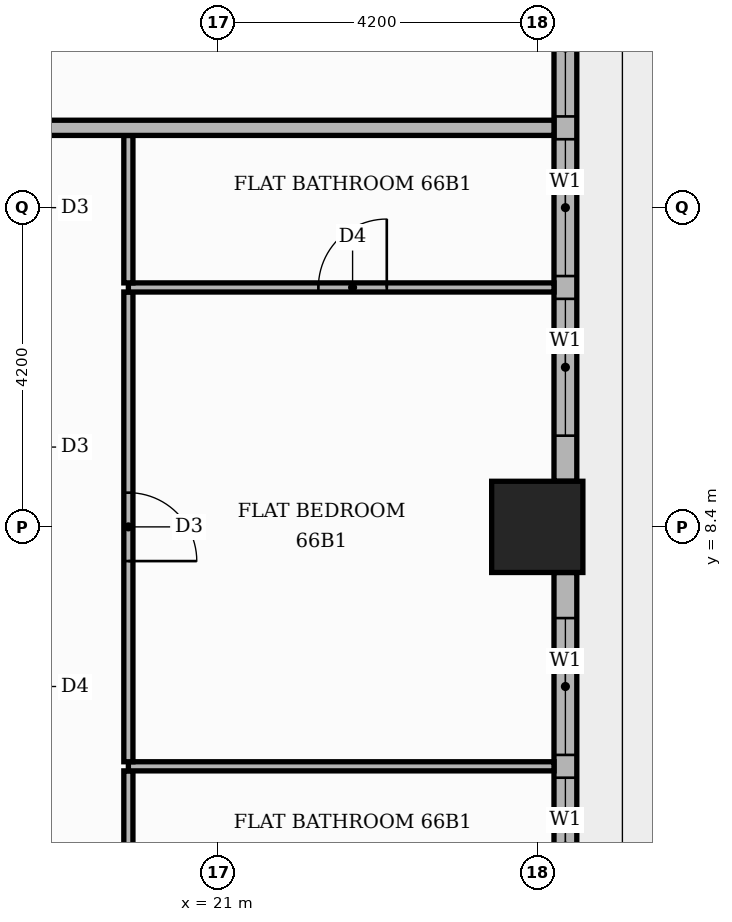
"""IFC4 building model, lengths in metres.
Left out: names, types, materials, properties, quantities, classifications, styles, units other than length and angle.
Written with IfcOpenShell. Run it as: python <this file> out.ifc"""

import sys

from ifc_helpers import new_model, si_unit, direction, frame, frame_2d, origin, origin_2d, place, context, subcontext, project, spatial, rectangle, extrude, element, fill, save


model = new_model("IFC4")
c1 = context("Model", 3, precision=1e-05, world=origin(), true_north=direction((0.0, 1.0)))
c2 = subcontext(c1, "Body", "Model", "MODEL_VIEW")
j1 = project(units=[si_unit("LENGTHUNIT", "METRE"), si_unit("PLANEANGLEUNIT", "RADIAN")], contexts=[c1])
p1 = place(None, origin())
s1 = spatial("IfcSite", under=j1, at=p1, CompositionType="ELEMENT")
p2 = place(p1, origin())
s2 = spatial("IfcBuilding", under=s1, at=p2, CompositionType="ELEMENT")
p3 = place(p2, frame((0.0, 0.0, 275.7)))
s3 = spatial("IfcBuildingStorey", under=s2, at=p3, CompositionType="ELEMENT", Elevation=275.7)
p4 = place(p3, frame((25.2, 8.4, 0.0), z_axis=(0.0, 0.0, 1.0), x_axis=(1.0, 0.0, 0.0)))
e1 = element("IfcColumn", 1, at=p4, inside=s3, PredefinedType="COLUMN", context=c2, shape_type="SweptSolid", body=[
    extrude(rectangle(XDim=1.2, YDim=1.2, at=origin_2d()), origin(), (0.0, 0.0, 1.0), 3.9),
])
p5 = place(p3, frame((25.57, 0.6, 0.0), z_axis=(0.0, 0.0, 1.0), x_axis=(0.0, 1.0, 0.0)))
e2 = element("IfcWall", 2, at=p5, inside=s3, PredefinedType="STANDARD", context=c2, shape_type="SweptSolid", body=[
    extrude(rectangle(XDim=7.2, YDim=0.3, at=frame_2d((3.6, 0.0))), origin(), (0.0, 0.0, 1.0), 3.48),
])
p6 = place(p5, frame((0.6, 0.0, 0.9)))
e3 = element("IfcOpeningElement", 3, at=p6, cuts=e2, PredefinedType="OPENING", context=c2, shape_type="SweptSolid", body=[
    extrude(rectangle(XDim=1.8, YDim=2.1, at=frame_2d((0.9, 1.05))), frame((0.0, 0.16, 0.0), z_axis=(0.0, -1.0, 0.0), x_axis=(1.0, 0.0, 0.0)), (0.0, 0.0, 1.0), 0.32),
])
p7 = place(p5, frame((2.7, 0.0, 0.9)))
e4 = element("IfcOpeningElement", 4, at=p7, cuts=e2, PredefinedType="OPENING", context=c2, shape_type="SweptSolid", body=[
    extrude(rectangle(XDim=1.8, YDim=2.1, at=frame_2d((0.9, 1.05))), frame((0.0, 0.16, 0.0), z_axis=(0.0, -1.0, 0.0), x_axis=(1.0, 0.0, 0.0)), (0.0, 0.0, 1.0), 0.32),
])
p8 = place(p5, frame((4.8, 0.0, 0.9)))
e5 = element("IfcOpeningElement", 5, at=p8, cuts=e2, PredefinedType="OPENING", context=c2, shape_type="SweptSolid", body=[
    extrude(rectangle(XDim=1.8, YDim=2.1, at=frame_2d((0.9, 1.05))), frame((0.0, 0.16, 0.0), z_axis=(0.0, -1.0, 0.0), x_axis=(1.0, 0.0, 0.0)), (0.0, 0.0, 1.0), 0.32),
])
p9 = place(p3, frame((25.57, 9.0, 0.0), z_axis=(0.0, 0.0, 1.0), x_axis=(0.0, 1.0, 0.0)))
e6 = element("IfcWall", 6, at=p9, inside=s3, PredefinedType="STANDARD", context=c2, shape_type="SweptSolid", body=[
    extrude(rectangle(XDim=7.2, YDim=0.3, at=frame_2d((3.6, 0.0))), origin(), (0.0, 0.0, 1.0), 3.48),
])
p10 = place(p9, frame((0.6, 0.0, 0.9)))
e7 = element("IfcOpeningElement", 7, at=p10, cuts=e6, PredefinedType="OPENING", context=c2, shape_type="SweptSolid", body=[
    extrude(rectangle(XDim=1.8, YDim=2.1, at=frame_2d((0.9, 1.05))), frame((0.0, 0.16, 0.0), z_axis=(0.0, -1.0, 0.0), x_axis=(1.0, 0.0, 0.0)), (0.0, 0.0, 1.0), 0.32),
])
p11 = place(p9, frame((2.7, 0.0, 0.9)))
e8 = element("IfcOpeningElement", 8, at=p11, cuts=e6, PredefinedType="OPENING", context=c2, shape_type="SweptSolid", body=[
    extrude(rectangle(XDim=1.8, YDim=2.1, at=frame_2d((0.9, 1.05))), frame((0.0, 0.16, 0.0), z_axis=(0.0, -1.0, 0.0), x_axis=(1.0, 0.0, 0.0)), (0.0, 0.0, 1.0), 0.32),
])
p12 = place(p9, frame((4.8, 0.0, 0.9)))
e9 = element("IfcOpeningElement", 9, at=p12, cuts=e6, PredefinedType="OPENING", context=c2, shape_type="SweptSolid", body=[
    extrude(rectangle(XDim=1.8, YDim=2.1, at=frame_2d((0.9, 1.05))), frame((0.0, 0.16, 0.0), z_axis=(0.0, -1.0, 0.0), x_axis=(1.0, 0.0, 0.0)), (0.0, 0.0, 1.0), 0.32),
])
p13 = place(p3, frame((19.82, 3.21, 0.0), z_axis=(0.0, 0.0, 1.0), x_axis=(0.0, 1.0, 0.0)))
e10 = element("IfcWall", 10, at=p13, inside=s3, PredefinedType="PARTITIONING", context=c2, shape_type="SweptSolid", body=[
    extrude(rectangle(XDim=1.98, YDim=0.12, at=frame_2d((0.99, 0.0))), origin(), (0.0, 0.0, 1.0), 3.48),
])
p14 = place(p3, frame((19.82, 5.25, 0.0), z_axis=(0.0, 0.0, 1.0), x_axis=(1.0, 0.0, 0.0)))
e11 = element("IfcWall", 11, at=p14, inside=s3, PredefinedType="PARTITIONING", context=c2, shape_type="SweptSolid", body=[
    extrude(rectangle(XDim=5.6, YDim=0.12, at=frame_2d((2.8, 0.0))), origin(), (0.0, 0.0, 1.0), 3.48),
])
p15 = place(p3, frame((19.82, 5.31, 0.0), z_axis=(0.0, 0.0, 1.0), x_axis=(0.0, 1.0, 0.0)))
e12 = element("IfcWall", 12, at=p15, inside=s3, PredefinedType="PARTITIONING", context=c2, shape_type="SweptSolid", body=[
    extrude(rectangle(XDim=6.18, YDim=0.12, at=frame_2d((3.09, 0.0))), origin(), (0.0, 0.0, 1.0), 3.48),
])
p16 = place(p15, frame((2.64, 0.0, 0.0)))
e13 = element("IfcOpeningElement", 13, at=p16, cuts=e12, PredefinedType="OPENING", context=c2, shape_type="SweptSolid", body=[
    extrude(rectangle(XDim=0.9, YDim=2.1, at=frame_2d((0.45, 1.05))), frame((0.0, 0.07, 0.0), z_axis=(0.0, -1.0, 0.0), x_axis=(1.0, 0.0, 0.0)), (0.0, 0.0, 1.0), 0.14),
])
p17 = place(p3, frame((19.82, 11.55, 0.0), z_axis=(0.0, 0.0, 1.0), x_axis=(1.0, 0.0, 0.0)))
e14 = element("IfcWall", 14, at=p17, inside=s3, PredefinedType="PARTITIONING", context=c2, shape_type="SweptSolid", body=[
    extrude(rectangle(XDim=5.6, YDim=0.12, at=frame_2d((2.8, 0.0))), origin(), (0.0, 0.0, 1.0), 3.48),
])
p18 = place(p17, frame((2.5, 0.0, 0.0)))
e15 = element("IfcOpeningElement", 15, at=p18, cuts=e14, PredefinedType="OPENING", context=c2, shape_type="SweptSolid", body=[
    extrude(rectangle(XDim=0.9, YDim=2.1, at=frame_2d((0.45, 1.05))), frame((0.0, 0.07, 0.0), z_axis=(0.0, -1.0, 0.0), x_axis=(1.0, 0.0, 0.0)), (0.0, 0.0, 1.0), 0.14),
])
p19 = place(p3, frame((19.82, 11.61, 0.0), z_axis=(0.0, 0.0, 1.0), x_axis=(0.0, 1.0, 0.0)))
e16 = element("IfcWall", 16, at=p19, inside=s3, PredefinedType="PARTITIONING", context=c2, shape_type="SweptSolid", body=[
    extrude(rectangle(XDim=1.94, YDim=0.12, at=frame_2d((0.97, 0.0))), origin(), (0.0, 0.0, 1.0), 3.48),
])
p20 = place(p3, frame((-13.65, 13.65, 0.0), z_axis=(0.0, 0.0, 1.0), x_axis=(1.0, 0.0, 0.0)))
e17 = element("IfcWall", 17, at=p20, inside=s3, PredefinedType="PARTITIONING", context=c2, shape_type="SweptSolid", body=[
    extrude(rectangle(XDim=39.07, YDim=0.2, at=frame_2d((19.535, 0.0))), origin(), (0.0, 0.0, 1.0), 3.48),
])
p21 = place(p20, frame((23.6, 0.0, 0.0)))
e18 = element("IfcOpeningElement", 18, at=p21, cuts=e17, PredefinedType="OPENING", context=c2, shape_type="SweptSolid", body=[
    extrude(rectangle(XDim=1.1, YDim=2.4, at=frame_2d((0.55, 1.2))), frame((0.0, 0.11, 0.0), z_axis=(0.0, -1.0, 0.0), x_axis=(1.0, 0.0, 0.0)), (0.0, 0.0, 1.0), 0.22),
])
p22 = place(p7, origin())
e19 = element("IfcWindow", 19, at=p22, inside=s3, PartitioningType="SINGLE_PANEL", PredefinedType="WINDOW", context=c2, shape_type="SweptSolid", body=[
    extrude(rectangle(XDim=1.8, YDim=2.1, at=frame_2d((0.9, 1.05))), frame((0.0, 0.03, 0.0), z_axis=(0.0, -1.0, 0.0), x_axis=(1.0, 0.0, 0.0)), (0.0, 0.0, 1.0), 0.06),
])
fill(e4, e19)
p23 = place(p8, origin())
e20 = element("IfcWindow", 20, at=p23, inside=s3, PartitioningType="SINGLE_PANEL", PredefinedType="WINDOW", context=c2, shape_type="SweptSolid", body=[
    extrude(rectangle(XDim=1.8, YDim=2.1, at=frame_2d((0.9, 1.05))), frame((0.0, 0.03, 0.0), z_axis=(0.0, -1.0, 0.0), x_axis=(1.0, 0.0, 0.0)), (0.0, 0.0, 1.0), 0.06),
])
fill(e5, e20)
p24 = place(p10, origin())
e21 = element("IfcWindow", 21, at=p24, inside=s3, PartitioningType="SINGLE_PANEL", PredefinedType="WINDOW", context=c2, shape_type="SweptSolid", body=[
    extrude(rectangle(XDim=1.8, YDim=2.1, at=frame_2d((0.9, 1.05))), frame((0.0, 0.03, 0.0), z_axis=(0.0, -1.0, 0.0), x_axis=(1.0, 0.0, 0.0)), (0.0, 0.0, 1.0), 0.06),
])
fill(e7, e21)
p25 = place(p11, origin())
e22 = element("IfcWindow", 22, at=p25, inside=s3, PartitioningType="SINGLE_PANEL", PredefinedType="WINDOW", context=c2, shape_type="SweptSolid", body=[
    extrude(rectangle(XDim=1.8, YDim=2.1, at=frame_2d((0.9, 1.05))), frame((0.0, 0.03, 0.0), z_axis=(0.0, -1.0, 0.0), x_axis=(1.0, 0.0, 0.0)), (0.0, 0.0, 1.0), 0.06),
])
fill(e8, e22)
p26 = place(p12, origin())
e23 = element("IfcWindow", 23, at=p26, inside=s3, PartitioningType="SINGLE_PANEL", PredefinedType="WINDOW", context=c2, shape_type="SweptSolid", body=[
    extrude(rectangle(XDim=1.8, YDim=2.1, at=frame_2d((0.9, 1.05))), frame((0.0, 0.03, 0.0), z_axis=(0.0, -1.0, 0.0), x_axis=(1.0, 0.0, 0.0)), (0.0, 0.0, 1.0), 0.06),
])
fill(e9, e23)
p27 = place(p16, frame((0.9, 0.0, 0.0), z_axis=(0.0, 0.0, 1.0), x_axis=(-1.0, 0.0, 0.0)))
e24 = element("IfcDoor", 24, at=p27, inside=s3, OperationType="SINGLE_SWING_LEFT", PredefinedType="DOOR", context=c2, shape_type="SweptSolid", body=[
    extrude(rectangle(XDim=0.9, YDim=2.1, at=frame_2d((0.45, 1.05))), frame((0.0, 0.025, 0.0), z_axis=(0.0, -1.0, 0.0), x_axis=(1.0, 0.0, 0.0)), (0.0, 0.0, 1.0), 0.05),
])
fill(e13, e24)
p28 = place(p18, origin())
e25 = element("IfcDoor", 25, at=p28, inside=s3, OperationType="SINGLE_SWING_RIGHT", PredefinedType="DOOR", context=c2, shape_type="SweptSolid", body=[
    extrude(rectangle(XDim=0.9, YDim=2.1, at=frame_2d((0.45, 1.05))), frame((0.0, 0.025, 0.0), z_axis=(0.0, -1.0, 0.0), x_axis=(1.0, 0.0, 0.0)), (0.0, 0.0, 1.0), 0.05),
])
fill(e15, e25)
save(model, sys.argv[1])
